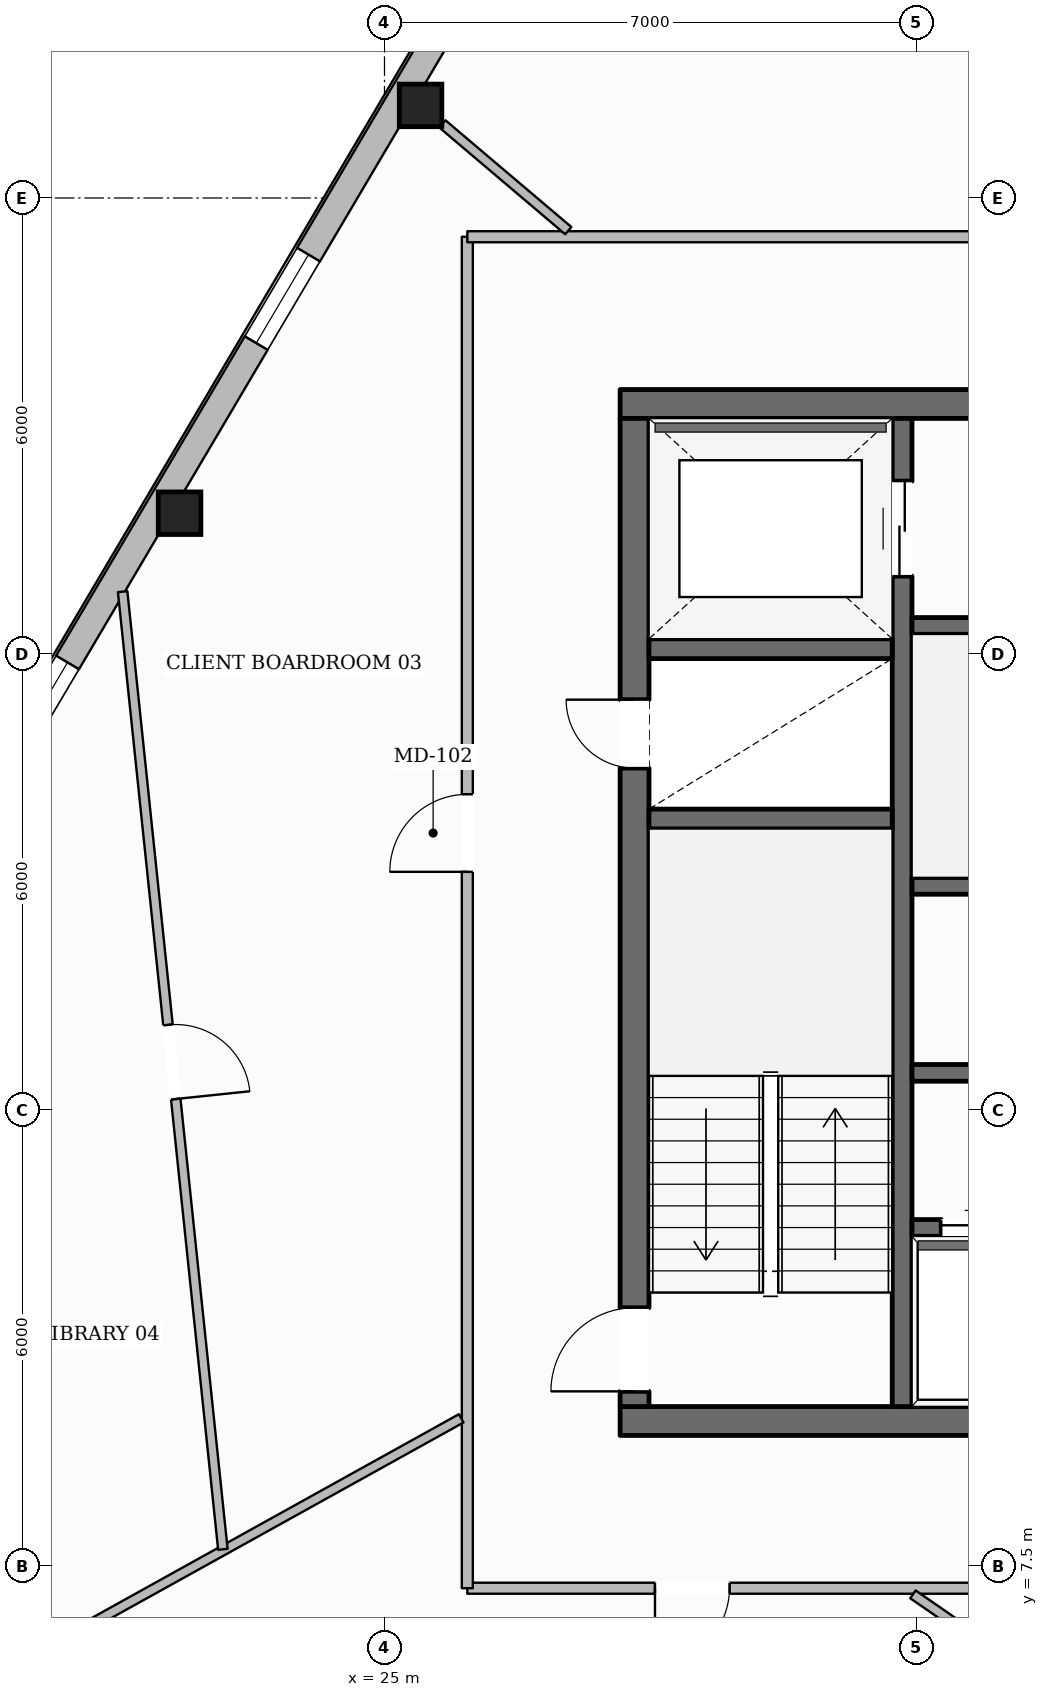
"""IFC4 building model, lengths in metres.
Left out: names, types, materials, properties, quantities, classifications, styles, units other than length and angle.
Written with IfcOpenShell. Run it as: python <this file> out.ifc"""

import sys

from ifc_helpers import new_model, si_unit, direction, frame, frame_2d, origin, origin_2d, place, context, subcontext, project, spatial, rectangle, hollow_rectangle, extrude, element, fill, save


model = new_model("IFC4")
c1 = context("Model", 3, precision=1e-05, world=origin(), true_north=direction((0.0, 1.0)))
c2 = subcontext(c1, "Body", "Model", "MODEL_VIEW")
j1 = project(units=[si_unit("LENGTHUNIT", "METRE"), si_unit("PLANEANGLEUNIT", "RADIAN")], contexts=[c1])
p1 = place(None, origin())
s1 = spatial("IfcSite", under=j1, at=p1, CompositionType="ELEMENT")
p2 = place(p1, origin())
s2 = spatial("IfcBuilding", under=s1, at=p2, CompositionType="ELEMENT")
p3 = place(p2, frame((0.0, 0.0, 274.15)))
s3 = spatial("IfcBuildingStorey", under=s2, at=p3, CompositionType="ELEMENT", Elevation=274.15)
p4 = place(p3, frame((28.1, 9.41, 0.0), z_axis=(0.0, 0.0, 1.0), x_axis=(1.0, 0.0, 0.0)))
e1 = element("IfcWall", 1, at=p4, inside=s3, PredefinedType="SOLIDWALL", context=c2, shape_type="SweptSolid", body=[
    extrude(rectangle(XDim=19.8, YDim=0.38, at=frame_2d((9.9, 0.0))), origin(), (0.0, 0.0, 1.0), 3.61),
])
p5 = place(p4, frame((10.4, 0.0, 0.0)))
e2 = element("IfcOpeningElement", 2, at=p5, cuts=e1, PredefinedType="OPENING", context=c2, shape_type="SweptSolid", body=[
    extrude(rectangle(XDim=1.4, YDim=2.2, at=frame_2d((0.7, 1.1))), frame((0.0, 0.2, 0.0), z_axis=(0.0, -1.0, 0.0), x_axis=(1.0, 0.0, 0.0)), (0.0, 0.0, 1.0), 0.4),
])
p6 = place(p3, frame((28.1, 22.79, 0.0), z_axis=(0.0, 0.0, 1.0), x_axis=(1.0, 0.0, 0.0)))
e3 = element("IfcWall", 3, at=p6, inside=s3, PredefinedType="SOLIDWALL", context=c2, shape_type="SweptSolid", body=[
    extrude(rectangle(XDim=19.8, YDim=0.38, at=frame_2d((9.9, 0.0))), origin(), (0.0, 0.0, 1.0), 3.61),
])
p7 = place(p6, frame((6.175, 0.0, 0.0)))
e4 = element("IfcOpeningElement", 4, at=p7, cuts=e3, PredefinedType="OPENING", context=c2, shape_type="SweptSolid", body=[
    extrude(rectangle(XDim=1.05, YDim=2.15, at=frame_2d((0.525, 1.075))), frame((0.0, 0.2, 0.0), z_axis=(0.0, -1.0, 0.0), x_axis=(1.0, 0.0, 0.0)), (0.0, 0.0, 1.0), 0.4),
])
p8 = place(p6, frame((12.575, 0.0, 0.0)))
e5 = element("IfcOpeningElement", 5, at=p8, cuts=e3, PredefinedType="OPENING", context=c2, shape_type="SweptSolid", body=[
    extrude(rectangle(XDim=1.05, YDim=2.15, at=frame_2d((0.525, 1.075))), frame((0.0, 0.2, 0.0), z_axis=(0.0, -1.0, 0.0), x_axis=(1.0, 0.0, 0.0)), (0.0, 0.0, 1.0), 0.4),
])
p9 = place(p3, frame((28.29, 9.6, 0.0), z_axis=(0.0, 0.0, 1.0), x_axis=(0.0, 1.0, 0.0)))
e6 = element("IfcWall", 6, at=p9, inside=s3, PredefinedType="SOLIDWALL", context=c2, shape_type="SweptSolid", body=[
    extrude(rectangle(XDim=13.0, YDim=0.38, at=frame_2d((6.5, 0.0))), origin(), (0.0, 0.0, 1.0), 3.61),
])
p10 = place(p9, frame((0.2, 0.0, 0.0)))
e7 = element("IfcOpeningElement", 7, at=p10, cuts=e6, PredefinedType="OPENING", context=c2, shape_type="SweptSolid", body=[
    extrude(rectangle(XDim=1.1, YDim=2.15, at=frame_2d((0.55, 1.075))), frame((0.0, 0.2, 0.0), z_axis=(0.0, -1.0, 0.0), x_axis=(1.0, 0.0, 0.0)), (0.0, 0.0, 1.0), 0.4),
])
p11 = place(p9, frame((8.4, 0.0, 0.0)))
e8 = element("IfcOpeningElement", 8, at=p11, cuts=e6, PredefinedType="OPENING", context=c2, shape_type="SweptSolid", body=[
    extrude(rectangle(XDim=0.9, YDim=2.1, at=frame_2d((0.45, 1.05))), frame((0.0, 0.2, 0.0), z_axis=(0.0, -1.0, 0.0), x_axis=(1.0, 0.0, 0.0)), (0.0, 0.0, 1.0), 0.4),
])
p12 = place(p3, frame((31.81, 9.6, 0.0), z_axis=(0.0, 0.0, 1.0), x_axis=(0.0, 1.0, 0.0)))
e9 = element("IfcWall", 9, at=p12, inside=s3, PredefinedType="SHEAR", context=c2, shape_type="SweptSolid", body=[
    extrude(rectangle(XDim=13.0, YDim=0.26, at=frame_2d((6.5, 0.0))), origin(), (0.0, 0.0, 1.0), 3.61),
])
p13 = place(p12, frame((10.925, 0.0, 0.0)))
e10 = element("IfcOpeningElement", 10, at=p13, cuts=e9, PredefinedType="OPENING", context=c2, shape_type="SweptSolid", body=[
    extrude(rectangle(XDim=1.25, YDim=2.25, at=frame_2d((0.625, 1.125))), frame((0.0, 0.14, 0.0), z_axis=(0.0, -1.0, 0.0), x_axis=(1.0, 0.0, 0.0)), (0.0, 0.0, 1.0), 0.28),
])
for number, where, z_axis, x_axis in (
    (11, (28.48, 17.33, 0.0), (0.0, 0.0, 1.0), (1.0, 0.0, 0.0)),
    (12, (28.48, 19.57, 0.0), (0.0, 0.0, 1.0), (1.0, 0.0, 0.0)),
):
    element("IfcWall", number, at=place(p3, frame(where, z_axis=z_axis, x_axis=x_axis)), inside=s3, PredefinedType="SHEAR", context=c2, shape_type="SweptSolid", body=[
        extrude(rectangle(XDim=3.2, YDim=0.26, at=frame_2d((1.6, 0.0))), origin(), (0.0, 0.0, 1.0), 3.61),
    ])
p14 = place(p3, frame((31.94, 19.87, 0.0), z_axis=(0.0, 0.0, 1.0), x_axis=(1.0, 0.0, 0.0)))
e13 = element("IfcWall", 13, at=p14, inside=s3, PredefinedType="SOLIDWALL", context=c2, shape_type="SweptSolid", body=[
    extrude(rectangle(XDim=12.12, YDim=0.22, at=frame_2d((6.06, 0.0))), origin(), (0.0, 0.0, 1.0), 3.61),
])
p15 = place(p14, frame((6.3, 0.0, 0.0)))
e14 = element("IfcOpeningElement", 14, at=p15, cuts=e13, PredefinedType="OPENING", context=c2, shape_type="SweptSolid", body=[
    extrude(rectangle(XDim=1.1, YDim=2.15, at=frame_2d((0.55, 1.075))), frame((0.0, 0.12, 0.0), z_axis=(0.0, -1.0, 0.0), x_axis=(1.0, 0.0, 0.0)), (0.0, 0.0, 1.0), 0.24),
])
p16 = place(p14, frame((9.51, 0.0, 0.0)))
e15 = element("IfcOpeningElement", 15, at=p16, cuts=e13, PredefinedType="OPENING", context=c2, shape_type="SweptSolid", body=[
    extrude(rectangle(XDim=0.9, YDim=2.1, at=frame_2d((0.45, 1.05))), frame((0.0, 0.12, 0.0), z_axis=(0.0, -1.0, 0.0), x_axis=(1.0, 0.0, 0.0)), (0.0, 0.0, 1.0), 0.24),
])
p17 = place(p3, frame((31.94, 16.45, 0.0), z_axis=(0.0, 0.0, 1.0), x_axis=(1.0, 0.0, 0.0)))
e16 = element("IfcWall", 16, at=p17, inside=s3, PredefinedType="SOLIDWALL", context=c2, shape_type="SweptSolid", body=[
    extrude(rectangle(XDim=12.12, YDim=0.22, at=frame_2d((6.06, 0.0))), origin(), (0.0, 0.0, 1.0), 3.61),
])
p18 = place(p3, frame((31.94, 13.99, 0.0), z_axis=(0.0, 0.0, 1.0), x_axis=(1.0, 0.0, 0.0)))
e17 = element("IfcWall", 17, at=p18, inside=s3, PredefinedType="SOLIDWALL", context=c2, shape_type="SweptSolid", body=[
    extrude(rectangle(XDim=12.12, YDim=0.22, at=frame_2d((6.06, 0.0))), origin(), (0.0, 0.0, 1.0), 3.61),
])
p19 = place(p18, frame((1.91, 0.0, 0.0)))
e18 = element("IfcOpeningElement", 18, at=p19, cuts=e17, PredefinedType="OPENING", context=c2, shape_type="SweptSolid", body=[
    extrude(rectangle(XDim=0.9, YDim=2.1, at=frame_2d((0.45, 1.05))), frame((0.0, 0.12, 0.0), z_axis=(0.0, -1.0, 0.0), x_axis=(1.0, 0.0, 0.0)), (0.0, 0.0, 1.0), 0.24),
])
p20 = place(p18, frame((7.95, 0.0, 0.0)))
e19 = element("IfcOpeningElement", 19, at=p20, cuts=e17, PredefinedType="OPENING", context=c2, shape_type="SweptSolid", body=[
    extrude(rectangle(XDim=1.02, YDim=2.15, at=frame_2d((0.51, 1.075))), frame((0.0, 0.12, 0.0), z_axis=(0.0, -1.0, 0.0), x_axis=(1.0, 0.0, 0.0)), (0.0, 0.0, 1.0), 0.24),
])
p21 = place(p3, frame((31.94, 11.95, 0.0), z_axis=(0.0, 0.0, 1.0), x_axis=(1.0, 0.0, 0.0)))
e20 = element("IfcWall", 20, at=p21, inside=s3, PredefinedType="SOLIDWALL", context=c2, shape_type="SweptSolid", body=[
    extrude(rectangle(XDim=6.19, YDim=0.22, at=frame_2d((3.095, 0.0))), origin(), (0.0, 0.0, 1.0), 3.61),
])
p22 = place(p21, frame((0.385, 0.0, 0.0)))
e21 = element("IfcOpeningElement", 21, at=p22, cuts=e20, PredefinedType="OPENING", context=c2, shape_type="SweptSolid", body=[
    extrude(rectangle(XDim=1.1, YDim=2.2, at=frame_2d((0.55, 1.1))), frame((0.0, 0.12, 0.0), z_axis=(0.0, -1.0, 0.0), x_axis=(1.0, 0.0, 0.0)), (0.0, 0.0, 1.0), 0.24),
])
p23 = place(p21, frame((2.435, 0.0, 0.0)))
e22 = element("IfcOpeningElement", 22, at=p23, cuts=e20, PredefinedType="OPENING", context=c2, shape_type="SweptSolid", body=[
    extrude(rectangle(XDim=1.1, YDim=2.2, at=frame_2d((0.55, 1.1))), frame((0.0, 0.12, 0.0), z_axis=(0.0, -1.0, 0.0), x_axis=(1.0, 0.0, 0.0)), (0.0, 0.0, 1.0), 0.24),
])
p24 = place(p21, frame((4.485, 0.0, 0.0)))
e23 = element("IfcOpeningElement", 23, at=p24, cuts=e20, PredefinedType="OPENING", context=c2, shape_type="SweptSolid", body=[
    extrude(rectangle(XDim=1.1, YDim=2.2, at=frame_2d((0.55, 1.1))), frame((0.0, 0.12, 0.0), z_axis=(0.0, -1.0, 0.0), x_axis=(1.0, 0.0, 0.0)), (0.0, 0.0, 1.0), 0.24),
])
for number, where, z_axis, x_axis in (
    (24, (25.475, 26.718, 0.0), (0.0, 0.0, 1.0), (1.0, 0.0, 0.0)),
    (25, (22.304, 21.353, 0.0), (0.0, 0.0, 1.0), (1.0, 0.0, 0.0)),
):
    element("IfcColumn", number, at=place(p3, frame(where, z_axis=z_axis, x_axis=x_axis)), inside=s3, PredefinedType="COLUMN", context=c2, shape_type="SweptSolid", body=[
        extrude(hollow_rectangle(XDim=0.56, YDim=0.56, WallThickness=0.025, at=origin_2d()), origin(), (0.0, 0.0, 1.0), 3.61),
    ])
p25 = place(p3, frame((15.485, 10.343, 0.0), z_axis=(0.0, 0.0, 1.0), x_axis=(0.508715156146, 0.860934892955, 0.0)))
e26 = element("IfcWall", 26, at=p25, inside=s3, PredefinedType="STANDARD", context=c2, shape_type="SweptSolid", body=[
    extrude(rectangle(XDim=38.349, YDim=0.35, at=frame_2d((19.175, 0.0))), origin(), (0.0, 0.0, 1.0), 3.196),
])
p26 = place(p25, frame((34.084, 0.0, 0.65)))
e27 = element("IfcOpeningElement", 27, at=p26, cuts=e26, PredefinedType="OPENING", context=c2, shape_type="SweptSolid", body=[
    extrude(rectangle(XDim=1.35, YDim=1.75, at=frame_2d((0.675, 0.875))), frame((0.0, 0.185, 0.0), z_axis=(0.0, -1.0, 0.0), x_axis=(1.0, 0.0, 0.0)), (0.0, 0.0, 1.0), 0.37),
])
p27 = place(p25, frame((27.852, 0.0, 0.65)))
e28 = element("IfcOpeningElement", 28, at=p27, cuts=e26, PredefinedType="OPENING", context=c2, shape_type="SweptSolid", body=[
    extrude(rectangle(XDim=1.35, YDim=1.75, at=frame_2d((0.675, 0.875))), frame((0.0, 0.185, 0.0), z_axis=(0.0, -1.0, 0.0), x_axis=(1.0, 0.0, 0.0)), (0.0, 0.0, 1.0), 0.37),
])
p28 = place(p25, frame((15.388, 0.0, 0.65)))
e29 = element("IfcOpeningElement", 29, at=p28, cuts=e26, PredefinedType="OPENING", context=c2, shape_type="SweptSolid", body=[
    extrude(rectangle(XDim=1.35, YDim=1.75, at=frame_2d((0.675, 0.875))), frame((0.0, 0.185, 0.0), z_axis=(0.0, -1.0, 0.0), x_axis=(1.0, 0.0, 0.0)), (0.0, 0.0, 1.0), 0.37),
])
p29 = place(p25, frame((9.156, 0.0, 0.65)))
e30 = element("IfcOpeningElement", 30, at=p29, cuts=e26, PredefinedType="OPENING", context=c2, shape_type="SweptSolid", body=[
    extrude(rectangle(XDim=1.35, YDim=1.75, at=frame_2d((0.675, 0.875))), frame((0.0, 0.185, 0.0), z_axis=(0.0, -1.0, 0.0), x_axis=(1.0, 0.0, 0.0)), (0.0, 0.0, 1.0), 0.37),
])
p30 = place(p25, frame((2.925, 0.0, 0.65)))
e31 = element("IfcOpeningElement", 31, at=p30, cuts=e26, PredefinedType="OPENING", context=c2, shape_type="SweptSolid", body=[
    extrude(rectangle(XDim=1.35, YDim=1.75, at=frame_2d((0.675, 0.875))), frame((0.0, 0.185, 0.0), z_axis=(0.0, -1.0, 0.0), x_axis=(1.0, 0.0, 0.0)), (0.0, 0.0, 1.0), 0.37),
])
p31 = place(p3, frame((49.91, 7.21, 0.0), z_axis=(0.0, 0.0, 1.0), x_axis=(-1.0, 0.0, 0.0)))
e32 = element("IfcWall", 32, at=p31, inside=s3, PredefinedType="PARTITIONING", context=c2, shape_type="SweptSolid", body=[
    extrude(rectangle(XDim=23.82, YDim=0.145, at=frame_2d((11.91, 0.0))), origin(), (0.0, 0.0, 1.0), 3.61),
])
p32 = place(p31, frame((11.528, 0.0, 0.0)))
e33 = element("IfcOpeningElement", 33, at=p32, cuts=e32, PredefinedType="OPENING", context=c2, shape_type="SweptSolid", body=[
    extrude(rectangle(XDim=0.98, YDim=2.15, at=frame_2d((0.49, 1.075))), frame((0.0, 0.083, 0.0), z_axis=(0.0, -1.0, 0.0), x_axis=(1.0, 0.0, 0.0)), (0.0, 0.0, 1.0), 0.165),
])
p33 = place(p31, frame((20.371, 0.0, 0.0)))
e34 = element("IfcOpeningElement", 34, at=p33, cuts=e32, PredefinedType="OPENING", context=c2, shape_type="SweptSolid", body=[
    extrude(rectangle(XDim=0.98, YDim=2.15, at=frame_2d((0.49, 1.075))), frame((0.0, 0.083, 0.0), z_axis=(0.0, -1.0, 0.0), x_axis=(1.0, 0.0, 0.0)), (0.0, 0.0, 1.0), 0.165),
])
p34 = place(p31, frame((2.444, 0.0, 0.0)))
e35 = element("IfcOpeningElement", 35, at=p34, cuts=e32, PredefinedType="OPENING", context=c2, shape_type="SweptSolid", body=[
    extrude(rectangle(XDim=1.4, YDim=2.2, at=frame_2d((0.7, 1.1))), frame((0.0, 0.083, 0.0), z_axis=(0.0, -1.0, 0.0), x_axis=(1.0, 0.0, 0.0)), (0.0, 0.0, 1.0), 0.165),
])
p35 = place(p3, frame((26.09, 7.21, 0.0), z_axis=(0.0, 0.0, 1.0), x_axis=(0.0, 1.0, 0.0)))
e36 = element("IfcWall", 36, at=p35, inside=s3, PredefinedType="PARTITIONING", context=c2, shape_type="SweptSolid", body=[
    extrude(rectangle(XDim=17.78, YDim=0.145, at=frame_2d((8.89, 0.0))), origin(), (0.0, 0.0, 1.0), 3.349),
])
p36 = place(p35, frame((9.425, 0.0, 0.0)))
e37 = element("IfcOpeningElement", 37, at=p36, cuts=e36, PredefinedType="OPENING", context=c2, shape_type="SweptSolid", body=[
    extrude(rectangle(XDim=1.02, YDim=2.15, at=frame_2d((0.51, 1.075))), frame((0.0, 0.083, 0.0), z_axis=(0.0, -1.0, 0.0), x_axis=(1.0, 0.0, 0.0)), (0.0, 0.0, 1.0), 0.165),
])
p37 = place(p3, frame((26.09, 24.99, 0.0), z_axis=(0.0, 0.0, 1.0), x_axis=(1.0, 0.0, 0.0)))
e38 = element("IfcWall", 38, at=p37, inside=s3, PredefinedType="PARTITIONING", context=c2, shape_type="SweptSolid", body=[
    extrude(rectangle(XDim=17.11, YDim=0.145, at=frame_2d((8.555, 0.0))), origin(), (0.0, 0.0, 1.0), 3.61),
])
p38 = place(p37, frame((8.47, 0.0, 0.0)))
e39 = element("IfcOpeningElement", 39, at=p38, cuts=e38, PredefinedType="OPENING", context=c2, shape_type="SweptSolid", body=[
    extrude(rectangle(XDim=0.88, YDim=2.1, at=frame_2d((0.44, 1.05))), frame((0.0, 0.083, 0.0), z_axis=(0.0, -1.0, 0.0), x_axis=(1.0, 0.0, 0.0)), (0.0, 0.0, 1.0), 0.165),
])
p39 = place(p37, frame((10.99, 0.0, 0.0)))
e40 = element("IfcOpeningElement", 40, at=p39, cuts=e38, PredefinedType="OPENING", context=c2, shape_type="SweptSolid", body=[
    extrude(rectangle(XDim=0.88, YDim=2.1, at=frame_2d((0.44, 1.05))), frame((0.0, 0.083, 0.0), z_axis=(0.0, -1.0, 0.0), x_axis=(1.0, 0.0, 0.0)), (0.0, 0.0, 1.0), 0.165),
])
p40 = place(p37, frame((13.37, 0.0, 0.0)))
e41 = element("IfcOpeningElement", 41, at=p40, cuts=e38, PredefinedType="OPENING", context=c2, shape_type="SweptSolid", body=[
    extrude(rectangle(XDim=0.96, YDim=2.1, at=frame_2d((0.48, 1.05))), frame((0.0, 0.083, 0.0), z_axis=(0.0, -1.0, 0.0), x_axis=(1.0, 0.0, 0.0)), (0.0, 0.0, 1.0), 0.165),
])
p41 = place(p3, frame((27.418, 25.071, 0.0), z_axis=(0.0, 0.0, 1.0), x_axis=(-0.762865508765, 0.646557202061, 0.0)))
e42 = element("IfcWall", 42, at=p41, inside=s3, PredefinedType="PARTITIONING", context=c2, shape_type="SweptSolid", body=[
    extrude(rectangle(XDim=2.17, YDim=0.125, at=frame_2d((1.085, 0.0))), origin(), (0.0, 0.0, 1.0), 3.61),
])
p42 = place(p3, frame((26.01, 9.445, 0.0), z_axis=(0.0, 0.0, 1.0), x_axis=(-0.874347500964, -0.485300368389, 0.0)))
e43 = element("IfcWall", 43, at=p42, inside=s3, PredefinedType="PARTITIONING", context=c2, shape_type="SweptSolid", body=[
    extrude(rectangle(XDim=7.746, YDim=0.125, at=frame_2d((3.873, 0.0))), origin(), (0.0, 0.0, 1.0), 3.246),
])
p43 = place(p3, frame((21.555, 20.321, 0.0), z_axis=(0.0, 0.0, 1.0), x_axis=(0.104108921444, -0.994565901525, 0.0)))
e44 = element("IfcWall", 44, at=p43, inside=s3, PredefinedType="PARTITIONING", context=c2, shape_type="SweptSolid", body=[
    extrude(rectangle(XDim=12.668, YDim=0.125, at=frame_2d((6.334, 0.0))), origin(), (0.0, 0.0, 1.0), 3.349),
])
p44 = place(p43, frame((5.731, 0.0, 0.0)))
e45 = element("IfcOpeningElement", 45, at=p44, cuts=e44, PredefinedType="OPENING", context=c2, shape_type="SweptSolid", body=[
    extrude(rectangle(XDim=0.98, YDim=2.15, at=frame_2d((0.49, 1.075))), frame((0.0, 0.073, 0.0), z_axis=(0.0, -1.0, 0.0), x_axis=(1.0, 0.0, 0.0)), (0.0, 0.0, 1.0), 0.145),
])
p45 = place(p3, frame((31.952, 7.129, 0.0), z_axis=(0.0, 0.0, 1.0), x_axis=(0.82280128664, -0.568329167564, 0.0)))
e46 = element("IfcWall", 46, at=p45, inside=s3, PredefinedType="PARTITIONING", context=c2, shape_type="SweptSolid", body=[
    extrude(rectangle(XDim=3.013, YDim=0.125, at=frame_2d((1.507, 0.0))), origin(), (0.0, 0.0, 1.0), 3.61),
])
p46 = place(p28, origin())
e47 = element("IfcWindow", 47, at=p46, inside=s3, PartitioningType="SINGLE_PANEL", PredefinedType="WINDOW", context=c2, shape_type="SweptSolid", body=[
    extrude(rectangle(XDim=1.35, YDim=1.75, at=frame_2d((0.675, 0.875))), frame((0.0, 0.03, 0.0), z_axis=(0.0, -1.0, 0.0), x_axis=(1.0, 0.0, 0.0)), (0.0, 0.0, 1.0), 0.06),
])
fill(e29, e47)
p47 = place(p29, origin())
e48 = element("IfcWindow", 48, at=p47, inside=s3, PartitioningType="SINGLE_PANEL", PredefinedType="WINDOW", context=c2, shape_type="SweptSolid", body=[
    extrude(rectangle(XDim=1.35, YDim=1.75, at=frame_2d((0.675, 0.875))), frame((0.0, 0.03, 0.0), z_axis=(0.0, -1.0, 0.0), x_axis=(1.0, 0.0, 0.0)), (0.0, 0.0, 1.0), 0.06),
])
fill(e30, e48)
p48 = place(p10, origin())
e49 = element("IfcDoor", 49, at=p48, inside=s3, OperationType="SINGLE_SWING_LEFT", PredefinedType="DOOR", context=c2, shape_type="SweptSolid", body=[
    extrude(rectangle(XDim=1.1, YDim=2.15, at=frame_2d((0.55, 1.075))), frame((0.0, 0.025, 0.0), z_axis=(0.0, -1.0, 0.0), x_axis=(1.0, 0.0, 0.0)), (0.0, 0.0, 1.0), 0.05),
])
fill(e7, e49)
p49 = place(p11, origin())
e50 = element("IfcDoor", 50, at=p49, inside=s3, OperationType="SINGLE_SWING_RIGHT", PredefinedType="DOOR", context=c2, shape_type="SweptSolid", body=[
    extrude(rectangle(XDim=0.9, YDim=2.1, at=frame_2d((0.45, 1.05))), frame((0.0, 0.025, 0.0), z_axis=(0.0, -1.0, 0.0), x_axis=(1.0, 0.0, 0.0)), (0.0, 0.0, 1.0), 0.05),
])
fill(e8, e50)
p50 = place(p13, origin())
e51 = element("IfcDoor", 51, at=p50, inside=s3, OperationType="DOUBLE_DOOR_SLIDING", PredefinedType="DOOR", context=c2, shape_type="SweptSolid", body=[
    extrude(rectangle(XDim=1.25, YDim=2.25, at=frame_2d((0.625, 1.125))), frame((0.0, 0.025, 0.0), z_axis=(0.0, -1.0, 0.0), x_axis=(1.0, 0.0, 0.0)), (0.0, 0.0, 1.0), 0.05),
])
fill(e10, e51)
p51 = place(p22, origin())
e52 = element("IfcDoor", 52, at=p51, inside=s3, OperationType="DOUBLE_DOOR_SLIDING", PredefinedType="DOOR", context=c2, shape_type="SweptSolid", body=[
    extrude(rectangle(XDim=1.1, YDim=2.2, at=frame_2d((0.55, 1.1))), frame((0.0, 0.025, 0.0), z_axis=(0.0, -1.0, 0.0), x_axis=(1.0, 0.0, 0.0)), (0.0, 0.0, 1.0), 0.05),
])
fill(e21, e52)
p52 = place(p36, origin())
e53 = element("IfcDoor", 53, at=p52, inside=s3, OperationType="SINGLE_SWING_LEFT", PredefinedType="DOOR", context=c2, shape_type="SweptSolid", body=[
    extrude(rectangle(XDim=1.02, YDim=2.15, at=frame_2d((0.51, 1.075))), frame((0.0, 0.025, 0.0), z_axis=(0.0, -1.0, 0.0), x_axis=(1.0, 0.0, 0.0)), (0.0, 0.0, 1.0), 0.05),
])
fill(e37, e53)
p53 = place(p44, origin())
e54 = element("IfcDoor", 54, at=p53, inside=s3, OperationType="SINGLE_SWING_RIGHT", PredefinedType="DOOR", context=c2, shape_type="SweptSolid", body=[
    extrude(rectangle(XDim=0.98, YDim=2.15, at=frame_2d((0.49, 1.075))), frame((0.0, 0.025, 0.0), z_axis=(0.0, -1.0, 0.0), x_axis=(1.0, 0.0, 0.0)), (0.0, 0.0, 1.0), 0.05),
])
fill(e45, e54)
p54 = place(p33, origin())
e55 = element("IfcDoor", 55, at=p54, inside=s3, OperationType="SINGLE_SWING_RIGHT", PredefinedType="DOOR", context=c2, shape_type="SweptSolid", body=[
    extrude(rectangle(XDim=0.98, YDim=2.15, at=frame_2d((0.49, 1.075))), frame((0.0, 0.025, 0.0), z_axis=(0.0, -1.0, 0.0), x_axis=(1.0, 0.0, 0.0)), (0.0, 0.0, 1.0), 0.05),
])
fill(e34, e55)
save(model, sys.argv[1])
